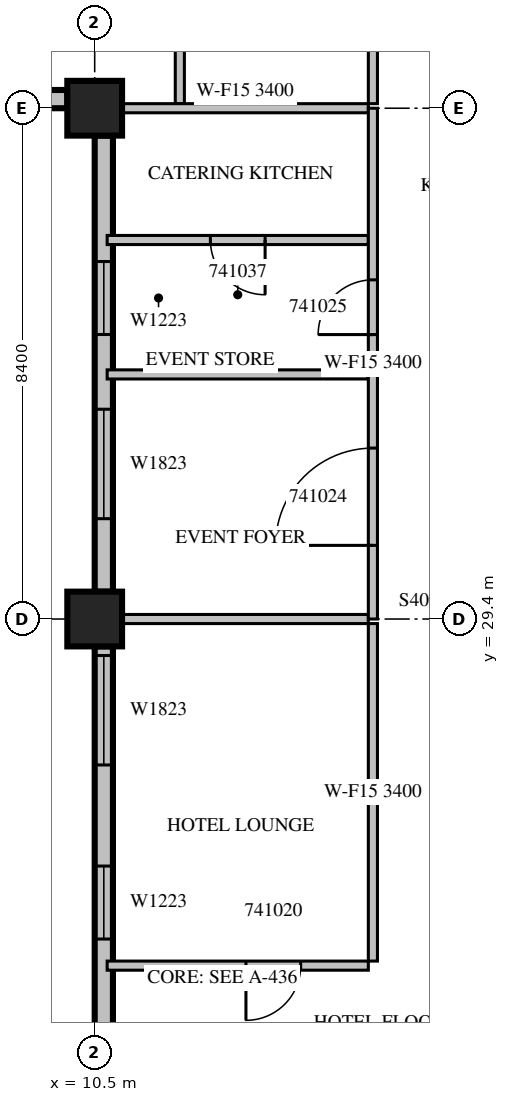
"""IFC4 building model, lengths in metres.
Left out: names, types, materials, properties, quantities, classifications, styles, units other than length and angle.
Written with IfcOpenShell. Run it as: python <this file> out.ifc"""

import sys

from ifc_helpers import new_model, si_unit, direction, frame, frame_2d, origin, origin_2d, place, context, subcontext, project, spatial, rectangle, extrude, source, transform, mapped, element, fill, save


model = new_model("IFC4")
c1 = context("Model", 3, precision=1e-05, world=origin(), true_north=direction((0.0, 1.0)))
c2 = subcontext(c1, "Body", "Model", "MODEL_VIEW")
j1 = project(units=[si_unit("LENGTHUNIT", "METRE"), si_unit("PLANEANGLEUNIT", "RADIAN")], contexts=[c1])
p1 = place(None, origin())
s1 = spatial("IfcSite", under=j1, at=p1, CompositionType="ELEMENT")
p2 = place(p1, origin())
s2 = spatial("IfcBuilding", under=s1, at=p2, CompositionType="ELEMENT")
p3 = place(p2, frame((0.0, 0.0, 189.2)))
s3 = spatial("IfcBuildingStorey", under=s2, at=p3, CompositionType="ELEMENT", Elevation=189.2)
m1 = source(origin(), c2, "Body", "SweptSolid", [
    extrude(rectangle(XDim=0.9, YDim=0.9, at=origin_2d()), origin(), (0.0, 0.0, 1.0), 3.8),
])
for number, where, z_axis, x_axis in (
    (1, (10.5, 29.4, 0.0), (0.0, 0.0, 1.0), (1.0, 0.0, 0.0)),
    (2, (10.5, 37.8, 0.0), (0.0, 0.0, 1.0), (1.0, 0.0, 0.0)),
):
    element("IfcColumn", number, at=place(p3, frame(where, z_axis=z_axis, x_axis=x_axis)), inside=s3, PredefinedType="COLUMN", context=c2, shape_type="MappedRepresentation", body=[
        mapped(m1, transform((0.0, 0.0, 0.0), scale=1.0)),
    ])
m2 = source(origin(), c2, "Body", "SweptSolid", [
    extrude(rectangle(XDim=1.35, YDim=0.3, at=frame_2d((0.675, 0.0))), origin(), (0.0, 0.0, 1.0), 3.4),
])
p4 = place(p3, frame((8.7, 37.95, 0.0), z_axis=(0.0, 0.0, 1.0), x_axis=(1.0, 0.0, 0.0)))
e3 = element("IfcWall", 3, at=p4, inside=s3, PredefinedType="STANDARD", context=c2, shape_type="MappedRepresentation", body=[
    mapped(m2, transform((0.0, 0.0, 0.0), scale=1.0)),
])
m3 = source(origin(), c2, "Body", "SweptSolid", [
    extrude(rectangle(XDim=7.5, YDim=0.3, at=frame_2d((3.75, 0.0))), origin(), (0.0, 0.0, 1.0), 3.4),
])
p5 = place(p3, frame((10.65, 37.35, 0.0), z_axis=(0.0, 0.0, 1.0), x_axis=(0.0, -1.0, 0.0)))
e4 = element("IfcWall", 4, at=p5, inside=s3, PredefinedType="STANDARD", context=c2, shape_type="MappedRepresentation", body=[
    mapped(m3, transform((0.0, 0.0, 0.0), scale=1.0)),
])
m4 = source(origin(), c2, "Body", "SweptSolid", [
    extrude(rectangle(XDim=1.8, YDim=2.3, at=frame_2d((0.9, 1.15))), frame((0.0, 0.16, 0.0), z_axis=(0.0, -1.0, 0.0), x_axis=(1.0, 0.0, 0.0)), (0.0, 0.0, 1.0), 0.32),
])
p6 = place(p5, frame((4.5, 0.0, 0.6)))
e5 = element("IfcOpeningElement", 5, at=p6, cuts=e4, PredefinedType="OPENING", context=c2, shape_type="MappedRepresentation", body=[
    mapped(m4, transform((0.0, 0.0, 0.0), scale=1.0)),
])
m5 = source(origin(), c2, "Body", "SweptSolid", [
    extrude(rectangle(XDim=1.2, YDim=2.3, at=frame_2d((0.6, 1.15))), frame((0.0, 0.16, 0.0), z_axis=(0.0, -1.0, 0.0), x_axis=(1.0, 0.0, 0.0)), (0.0, 0.0, 1.0), 0.32),
])
p7 = place(p5, frame((2.071, 0.0, 0.6)))
e6 = element("IfcOpeningElement", 6, at=p7, cuts=e4, PredefinedType="OPENING", context=c2, shape_type="MappedRepresentation", body=[
    mapped(m5, transform((0.0, 0.0, 0.0), scale=1.0)),
])
m6 = source(origin(), c2, "Body", "SweptSolid", [
    extrude(rectangle(XDim=7.15, YDim=0.3, at=frame_2d((3.575, 0.0))), origin(), (0.0, 0.0, 1.0), 3.4),
])
p8 = place(p3, frame((10.65, 28.95, 0.0), z_axis=(0.0, 0.0, 1.0), x_axis=(0.0, -1.0, 0.0)))
e7 = element("IfcWall", 7, at=p8, inside=s3, PredefinedType="STANDARD", context=c2, shape_type="MappedRepresentation", body=[
    mapped(m6, transform((0.0, 0.0, 0.0), scale=1.0)),
])
p9 = place(p8, frame((0.15, 0.0, 0.6)))
e8 = element("IfcOpeningElement", 8, at=p9, cuts=e7, PredefinedType="OPENING", context=c2, shape_type="MappedRepresentation", body=[
    mapped(m4, transform((0.0, 0.0, 0.0), scale=1.0)),
])
p10 = place(p8, frame((3.612, 0.0, 0.6)))
e9 = element("IfcOpeningElement", 9, at=p10, cuts=e7, PredefinedType="OPENING", context=c2, shape_type="MappedRepresentation", body=[
    mapped(m5, transform((0.0, 0.0, 0.0), scale=1.0)),
])
m7 = source(origin(), c2, "Body", "SweptSolid", [
    extrude(rectangle(XDim=4.295, YDim=0.15, at=frame_2d((2.147, 0.0))), origin(), (0.0, 0.0, 1.0), 3.4),
])
p11 = place(p3, frame((10.705, 23.7, 0.0), z_axis=(0.0, 0.0, 1.0), x_axis=(1.0, 0.0, 0.0)))
e10 = element("IfcWall", 10, at=p11, inside=s3, PredefinedType="PARTITIONING", context=c2, shape_type="MappedRepresentation", body=[
    mapped(m7, transform((0.0, 0.0, 0.0), scale=1.0)),
])
m8 = source(origin(), c2, "Body", "SweptSolid", [
    extrude(rectangle(XDim=0.9, YDim=2.1, at=frame_2d((0.45, 1.05))), frame((0.0, 0.085, 0.0), z_axis=(0.0, -1.0, 0.0), x_axis=(1.0, 0.0, 0.0)), (0.0, 0.0, 1.0), 0.17),
])
p12 = place(p11, frame((2.283, 0.0, 0.0)))
e11 = element("IfcOpeningElement", 11, at=p12, cuts=e10, PredefinedType="OPENING", context=c2, shape_type="MappedRepresentation", body=[
    mapped(m8, transform((0.0, 0.0, 0.0), scale=1.0)),
])
m9 = source(origin(), c2, "Body", "SweptSolid", [
    extrude(rectangle(XDim=5.55, YDim=0.15, at=frame_2d((2.775, 0.0))), origin(), (0.0, 0.0, 1.0), 3.4),
])
p13 = place(p3, frame((15.075, 23.775, 0.0), z_axis=(0.0, 0.0, 1.0), x_axis=(0.0, 1.0, 0.0)))
e12 = element("IfcWall", 12, at=p13, inside=s3, PredefinedType="PARTITIONING", context=c2, shape_type="MappedRepresentation", body=[
    mapped(m9, transform((0.0, 0.0, 0.0), scale=1.0)),
])
m10 = source(origin(), c2, "Body", "SweptSolid", [
    extrude(rectangle(XDim=4.051, YDim=0.15, at=frame_2d((2.026, 0.0))), origin(), (0.0, 0.0, 1.0), 3.4),
])
p14 = place(p3, frame((15.0, 29.4, 0.0), z_axis=(0.0, 0.0, 1.0), x_axis=(-1.0, 0.0, 0.0)))
e13 = element("IfcWall", 13, at=p14, inside=s3, PredefinedType="PARTITIONING", context=c2, shape_type="MappedRepresentation", body=[
    mapped(m10, transform((0.0, 0.0, 0.0), scale=1.0)),
])
m11 = source(origin(), c2, "Body", "SweptSolid", [
    extrude(rectangle(XDim=6.45, YDim=0.15, at=frame_2d((3.225, 0.0))), origin(), (0.0, 0.0, 1.0), 3.4),
])
p15 = place(p3, frame((11.9, 44.325, 0.0), z_axis=(0.0, 0.0, 1.0), x_axis=(0.0, -1.0, 0.0)))
e14 = element("IfcWall", 14, at=p15, inside=s3, PredefinedType="PARTITIONING", context=c2, shape_type="MappedRepresentation", body=[
    mapped(m11, transform((0.0, 0.0, 0.0), scale=1.0)),
])
p16 = place(p3, frame((15.075, 37.875, 0.0), z_axis=(0.0, 0.0, 1.0), x_axis=(0.0, 1.0, 0.0)))
e15 = element("IfcWall", 15, at=p16, inside=s3, PredefinedType="PARTITIONING", context=c2, shape_type="MappedRepresentation", body=[
    mapped(m11, transform((0.0, 0.0, 0.0), scale=1.0)),
])
p17 = place(p16, frame((2.737, 0.0, 0.0)))
e16 = element("IfcOpeningElement", 16, at=p17, cuts=e15, PredefinedType="OPENING", context=c2, shape_type="MappedRepresentation", body=[
    mapped(m8, transform((0.0, 0.0, 0.0), scale=1.0)),
])
p18 = place(p3, frame((15.0, 33.422, 0.0), z_axis=(0.0, 0.0, 1.0), x_axis=(-1.0, 0.0, 0.0)))
e17 = element("IfcWall", 17, at=p18, inside=s3, PredefinedType="PARTITIONING", context=c2, shape_type="MappedRepresentation", body=[
    mapped(m7, transform((0.0, 0.0, 0.0), scale=1.0)),
])
p19 = place(p3, frame((15.0, 35.633, 0.0), z_axis=(0.0, 0.0, 1.0), x_axis=(-1.0, 0.0, 0.0)))
e18 = element("IfcWall", 18, at=p19, inside=s3, PredefinedType="PARTITIONING", context=c2, shape_type="MappedRepresentation", body=[
    mapped(m7, transform((0.0, 0.0, 0.0), scale=1.0)),
])
p20 = place(p19, frame((1.698, 0.0, 0.0)))
e19 = element("IfcOpeningElement", 19, at=p20, cuts=e18, PredefinedType="OPENING", context=c2, shape_type="MappedRepresentation", body=[
    mapped(m8, transform((0.0, 0.0, 0.0), scale=1.0)),
])
p21 = place(p3, frame((15.0, 37.8, 0.0), z_axis=(0.0, 0.0, 1.0), x_axis=(-1.0, 0.0, 0.0)))
e20 = element("IfcWall", 20, at=p21, inside=s3, PredefinedType="PARTITIONING", context=c2, shape_type="MappedRepresentation", body=[
    mapped(m10, transform((0.0, 0.0, 0.0), scale=1.0)),
])
m12 = source(origin(), c2, "Body", "SweptSolid", [
    extrude(rectangle(XDim=8.4, YDim=0.15, at=frame_2d((4.2, 0.0))), origin(), (0.0, 0.0, 1.0), 3.4),
])
p22 = place(p3, frame((15.075, 29.4, 0.0), z_axis=(0.0, 0.0, 1.0), x_axis=(0.0, 1.0, 0.0)))
e21 = element("IfcWall", 21, at=p22, inside=s3, PredefinedType="PARTITIONING", context=c2, shape_type="MappedRepresentation", body=[
    mapped(m12, transform((0.0, 0.0, 0.0), scale=1.0)),
])
m13 = source(origin(), c2, "Body", "SweptSolid", [
    extrude(rectangle(XDim=1.6, YDim=2.1, at=frame_2d((0.8, 1.05))), frame((0.0, 0.085, 0.0), z_axis=(0.0, -1.0, 0.0), x_axis=(1.0, 0.0, 0.0)), (0.0, 0.0, 1.0), 0.17),
])
p23 = place(p22, frame((1.211, 0.0, 0.0)))
e22 = element("IfcOpeningElement", 22, at=p23, cuts=e21, PredefinedType="OPENING", context=c2, shape_type="MappedRepresentation", body=[
    mapped(m13, transform((0.0, 0.0, 0.0), scale=1.0)),
])
p24 = place(p22, frame((4.678, 0.0, 0.0)))
e23 = element("IfcOpeningElement", 23, at=p24, cuts=e21, PredefinedType="OPENING", context=c2, shape_type="MappedRepresentation", body=[
    mapped(m8, transform((0.0, 0.0, 0.0), scale=1.0)),
])
m14 = source(origin(), c2, "Body", "SweptSolid", [
    extrude(rectangle(XDim=1.8, YDim=2.3, at=frame_2d((0.9, 1.15))), frame((0.0, 0.03, 0.0), z_axis=(0.0, -1.0, 0.0), x_axis=(1.0, 0.0, 0.0)), (0.0, 0.0, 1.0), 0.06),
])
p25 = place(p6, origin())
e24 = element("IfcWindow", 24, at=p25, inside=s3, PartitioningType="SINGLE_PANEL", PredefinedType="WINDOW", context=c2, shape_type="MappedRepresentation", body=[
    mapped(m14, transform((0.0, 0.0, 0.0), scale=1.0)),
])
fill(e5, e24)
p26 = place(p9, origin())
e25 = element("IfcWindow", 25, at=p26, inside=s3, PartitioningType="SINGLE_PANEL", PredefinedType="WINDOW", context=c2, shape_type="MappedRepresentation", body=[
    mapped(m14, transform((0.0, 0.0, 0.0), scale=1.0)),
])
fill(e8, e25)
m15 = source(origin(), c2, "Body", "SweptSolid", [
    extrude(rectangle(XDim=1.2, YDim=2.3, at=frame_2d((0.6, 1.15))), frame((0.0, 0.03, 0.0), z_axis=(0.0, -1.0, 0.0), x_axis=(1.0, 0.0, 0.0)), (0.0, 0.0, 1.0), 0.06),
])
p27 = place(p7, origin())
e26 = element("IfcWindow", 26, at=p27, inside=s3, PartitioningType="SINGLE_PANEL", PredefinedType="WINDOW", context=c2, shape_type="MappedRepresentation", body=[
    mapped(m15, transform((0.0, 0.0, 0.0), scale=1.0)),
])
fill(e6, e26)
p28 = place(p10, origin())
e27 = element("IfcWindow", 27, at=p28, inside=s3, PartitioningType="SINGLE_PANEL", PredefinedType="WINDOW", context=c2, shape_type="MappedRepresentation", body=[
    mapped(m15, transform((0.0, 0.0, 0.0), scale=1.0)),
])
fill(e9, e27)
m16 = source(origin(), c2, "Body", "SweptSolid", [
    extrude(rectangle(XDim=0.9, YDim=2.1, at=frame_2d((0.45, 1.05))), frame((0.0, 0.025, 0.0), z_axis=(0.0, -1.0, 0.0), x_axis=(1.0, 0.0, 0.0)), (0.0, 0.0, 1.0), 0.05),
])
p29 = place(p12, origin())
e28 = element("IfcDoor", 28, at=p29, inside=s3, OperationType="SINGLE_SWING_RIGHT", PredefinedType="DOOR", context=c2, shape_type="MappedRepresentation", body=[
    mapped(m16, transform((0.0, 0.0, 0.0), scale=1.0)),
])
fill(e11, e28)
m17 = source(origin(), c2, "Body", "SweptSolid", [
    extrude(rectangle(XDim=1.6, YDim=2.1, at=frame_2d((0.8, 1.05))), frame((0.0, 0.025, 0.0), z_axis=(0.0, -1.0, 0.0), x_axis=(1.0, 0.0, 0.0)), (0.0, 0.0, 1.0), 0.05),
])
p30 = place(p23, origin())
e29 = element("IfcDoor", 29, at=p30, inside=s3, OperationType="SINGLE_SWING_LEFT", PredefinedType="DOOR", context=c2, shape_type="MappedRepresentation", body=[
    mapped(m17, transform((0.0, 0.0, 0.0), scale=1.0)),
])
fill(e22, e29)
p31 = place(p24, origin())
e30 = element("IfcDoor", 30, at=p31, inside=s3, OperationType="SINGLE_SWING_LEFT", PredefinedType="DOOR", context=c2, shape_type="MappedRepresentation", body=[
    mapped(m16, transform((0.0, 0.0, 0.0), scale=1.0)),
])
fill(e23, e30)
p32 = place(p20, origin())
e31 = element("IfcDoor", 31, at=p32, inside=s3, OperationType="SINGLE_SWING_LEFT", PredefinedType="DOOR", context=c2, shape_type="MappedRepresentation", body=[
    mapped(m16, transform((0.0, 0.0, 0.0), scale=1.0)),
])
fill(e19, e31)
save(model, sys.argv[1])
